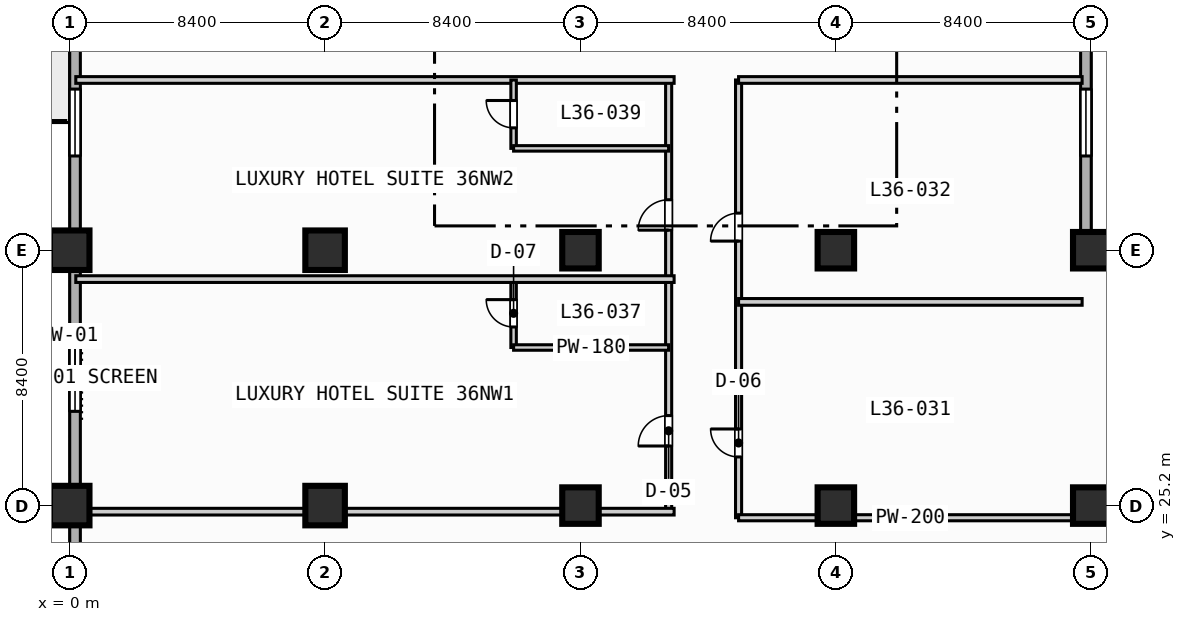
"""IFC4 building model, lengths in metres.
Left out: names, types, materials, properties, quantities, classifications, styles, units other than length and angle.
Written with IfcOpenShell. Run it as: python <this file> out.ifc"""

import sys

from ifc_helpers import new_model, si_unit, direction, frame, frame_2d, origin, origin_2d, place, context, subcontext, project, spatial, rectangle, extrude, element, fill, save


model = new_model("IFC4")
c1 = context("Model", 3, precision=1e-05, world=origin(), true_north=direction((0.0, 1.0)))
c2 = subcontext(c1, "Body", "Model", "MODEL_VIEW")
j1 = project(units=[si_unit("LENGTHUNIT", "METRE"), si_unit("PLANEANGLEUNIT", "RADIAN")], contexts=[c1])
p1 = place(None, origin())
s1 = spatial("IfcSite", under=j1, at=p1, CompositionType="ELEMENT")
p2 = place(p1, origin())
s2 = spatial("IfcBuilding", under=s1, at=p2, CompositionType="ELEMENT")
p3 = place(p2, frame((0.0, 0.0, 149.4)))
s3 = spatial("IfcBuildingStorey", under=s2, at=p3, CompositionType="ELEMENT", Elevation=149.4)
for number, where, z_axis, x_axis in (
    (1, (0.0, 25.2, 0.0), (0.0, 0.0, 1.0), (1.0, 0.0, 0.0)),
    (2, (0.0, 33.6, 0.0), (0.0, 0.0, 1.0), (1.0, 0.0, 0.0)),
    (3, (8.4, 25.2, 0.0), (0.0, 0.0, 1.0), (1.0, 0.0, 0.0)),
    (4, (8.4, 33.6, 0.0), (0.0, 0.0, 1.0), (1.0, 0.0, 0.0)),
):
    element("IfcColumn", number, at=place(p3, frame(where, z_axis=z_axis, x_axis=x_axis)), inside=s3, PredefinedType="COLUMN", context=c2, shape_type="SweptSolid", body=[
        extrude(rectangle(XDim=1.3, YDim=1.3, at=origin_2d()), origin(), (0.0, 0.0, 1.0), 3.8),
    ])
for number, where, z_axis, x_axis in (
    (5, (16.8, 25.2, 0.0), (0.0, 0.0, 1.0), (1.0, 0.0, 0.0)),
    (6, (16.8, 33.6, 0.0), (0.0, 0.0, 1.0), (1.0, 0.0, 0.0)),
    (7, (25.2, 25.2, 0.0), (0.0, 0.0, 1.0), (1.0, 0.0, 0.0)),
    (8, (25.2, 33.6, 0.0), (0.0, 0.0, 1.0), (1.0, 0.0, 0.0)),
    (9, (33.6, 25.2, 0.0), (0.0, 0.0, 1.0), (1.0, 0.0, 0.0)),
    (10, (33.6, 33.6, 0.0), (0.0, 0.0, 1.0), (1.0, 0.0, 0.0)),
):
    element("IfcColumn", number, at=place(p3, frame(where, z_axis=z_axis, x_axis=x_axis)), inside=s3, PredefinedType="COLUMN", context=c2, shape_type="SweptSolid", body=[
        extrude(rectangle(XDim=1.2, YDim=1.2, at=origin_2d()), origin(), (0.0, 0.0, 1.0), 3.8),
    ])
p4 = place(p3, frame((0.175, 3.175, 0.0), z_axis=(0.0, 0.0, 1.0), x_axis=(0.0, 1.0, 0.0)))
e11 = element("IfcWall", 11, at=p4, inside=s3, PredefinedType="STANDARD", context=c2, shape_type="SweptSolid", body=[
    extrude(rectangle(XDim=86.05, YDim=0.35, at=frame_2d((43.025, 0.0))), origin(), (0.0, 0.0, 1.0), 3.55),
])
p5 = place(p4, frame((42.325, 0.0, 0.0)))
e12 = element("IfcOpeningElement", 12, at=p5, cuts=e11, PredefinedType="OPENING", context=c2, shape_type="SweptSolid", body=[
    extrude(rectangle(XDim=1.4, YDim=2.2, at=frame_2d((0.7, 1.1))), frame((0.0, 0.185, 0.0), z_axis=(0.0, -1.0, 0.0), x_axis=(1.0, 0.0, 0.0)), (0.0, 0.0, 1.0), 0.37),
])
p6 = place(p4, frame((25.125, 0.0, 0.85)))
e13 = element("IfcOpeningElement", 13, at=p6, cuts=e11, PredefinedType="OPENING", context=c2, shape_type="SweptSolid", body=[
    extrude(rectangle(XDim=2.2, YDim=1.8, at=frame_2d((1.1, 0.9))), frame((0.0, 0.185, 0.0), z_axis=(0.0, -1.0, 0.0), x_axis=(1.0, 0.0, 0.0)), (0.0, 0.0, 1.0), 0.37),
])
p7 = place(p4, frame((33.525, 0.0, 0.85)))
e14 = element("IfcOpeningElement", 14, at=p7, cuts=e11, PredefinedType="OPENING", context=c2, shape_type="SweptSolid", body=[
    extrude(rectangle(XDim=2.2, YDim=1.8, at=frame_2d((1.1, 0.9))), frame((0.0, 0.185, 0.0), z_axis=(0.0, -1.0, 0.0), x_axis=(1.0, 0.0, 0.0)), (0.0, 0.0, 1.0), 0.37),
])
p8 = place(p4, frame((58.725, 0.0, 0.85)))
e15 = element("IfcOpeningElement", 15, at=p8, cuts=e11, PredefinedType="OPENING", context=c2, shape_type="SweptSolid", body=[
    extrude(rectangle(XDim=2.2, YDim=1.8, at=frame_2d((1.1, 0.9))), frame((0.0, 0.185, 0.0), z_axis=(0.0, -1.0, 0.0), x_axis=(1.0, 0.0, 0.0)), (0.0, 0.0, 1.0), 0.37),
])
p9 = place(p4, frame((65.125, 0.0, 0.85)))
e16 = element("IfcOpeningElement", 16, at=p9, cuts=e11, PredefinedType="OPENING", context=c2, shape_type="SweptSolid", body=[
    extrude(rectangle(XDim=1.8, YDim=1.8, at=frame_2d((0.9, 0.9))), frame((0.0, 0.185, 0.0), z_axis=(0.0, -1.0, 0.0), x_axis=(1.0, 0.0, 0.0)), (0.0, 0.0, 1.0), 0.37),
])
p10 = place(p4, frame((73.275, 0.0, 0.85)))
e17 = element("IfcOpeningElement", 17, at=p10, cuts=e11, PredefinedType="OPENING", context=c2, shape_type="SweptSolid", body=[
    extrude(rectangle(XDim=1.8, YDim=1.8, at=frame_2d((0.9, 0.9))), frame((0.0, 0.185, 0.0), z_axis=(0.0, -1.0, 0.0), x_axis=(1.0, 0.0, 0.0)), (0.0, 0.0, 1.0), 0.37),
])
p11 = place(p4, frame((81.625, 0.0, 0.85)))
e18 = element("IfcOpeningElement", 18, at=p11, cuts=e11, PredefinedType="OPENING", context=c2, shape_type="SweptSolid", body=[
    extrude(rectangle(XDim=1.8, YDim=1.8, at=frame_2d((0.9, 0.9))), frame((0.0, 0.185, 0.0), z_axis=(0.0, -1.0, 0.0), x_axis=(1.0, 0.0, 0.0)), (0.0, 0.0, 1.0), 0.37),
])
p12 = place(p3, frame((33.425, 89.225, 0.0), z_axis=(0.0, 0.0, 1.0), x_axis=(0.0, -1.0, 0.0)))
e19 = element("IfcWall", 19, at=p12, inside=s3, PredefinedType="STANDARD", context=c2, shape_type="SweptSolid", body=[
    extrude(rectangle(XDim=55.8, YDim=0.35, at=frame_2d((27.9, 0.0))), origin(), (0.0, 0.0, 1.0), 3.55),
])
p13 = place(p12, frame((50.325, 0.0, 0.85)))
e20 = element("IfcOpeningElement", 20, at=p13, cuts=e19, PredefinedType="OPENING", context=c2, shape_type="SweptSolid", body=[
    extrude(rectangle(XDim=2.2, YDim=1.8, at=frame_2d((1.1, 0.9))), frame((0.0, 0.185, 0.0), z_axis=(0.0, -1.0, 0.0), x_axis=(1.0, 0.0, 0.0)), (0.0, 0.0, 1.0), 0.37),
])
p14 = place(p12, frame((33.525, 0.0, 0.85)))
e21 = element("IfcOpeningElement", 21, at=p14, cuts=e19, PredefinedType="OPENING", context=c2, shape_type="SweptSolid", body=[
    extrude(rectangle(XDim=2.2, YDim=1.8, at=frame_2d((1.1, 0.9))), frame((0.0, 0.185, 0.0), z_axis=(0.0, -1.0, 0.0), x_axis=(1.0, 0.0, 0.0)), (0.0, 0.0, 1.0), 0.37),
])
p15 = place(p12, frame((25.125, 0.0, 0.85)))
e22 = element("IfcOpeningElement", 22, at=p15, cuts=e19, PredefinedType="OPENING", context=c2, shape_type="SweptSolid", body=[
    extrude(rectangle(XDim=2.2, YDim=1.8, at=frame_2d((1.1, 0.9))), frame((0.0, 0.185, 0.0), z_axis=(0.0, -1.0, 0.0), x_axis=(1.0, 0.0, 0.0)), (0.0, 0.0, 1.0), 0.37),
])
p16 = place(p12, frame((16.725, 0.0, 0.85)))
e23 = element("IfcOpeningElement", 23, at=p16, cuts=e19, PredefinedType="OPENING", context=c2, shape_type="SweptSolid", body=[
    extrude(rectangle(XDim=2.2, YDim=1.8, at=frame_2d((1.1, 0.9))), frame((0.0, 0.185, 0.0), z_axis=(0.0, -1.0, 0.0), x_axis=(1.0, 0.0, 0.0)), (0.0, 0.0, 1.0), 0.37),
])
p17 = place(p12, frame((8.325, 0.0, 0.85)))
e24 = element("IfcOpeningElement", 24, at=p17, cuts=e19, PredefinedType="OPENING", context=c2, shape_type="SweptSolid", body=[
    extrude(rectangle(XDim=2.2, YDim=1.8, at=frame_2d((1.1, 0.9))), frame((0.0, 0.185, 0.0), z_axis=(0.0, -1.0, 0.0), x_axis=(1.0, 0.0, 0.0)), (0.0, 0.0, 1.0), 0.37),
])
p18 = place(p3, frame((33.425, 33.425, 0.0), z_axis=(0.0, 0.0, 1.0), x_axis=(1.0, 0.0, 0.0)))
e25 = element("IfcWall", 25, at=p18, inside=s3, PredefinedType="STANDARD", context=c2, shape_type="SweptSolid", body=[
    extrude(rectangle(XDim=39.0, YDim=0.35, at=frame_2d((19.5, 0.0))), origin(), (0.0, 0.0, 1.0), 3.55),
])
p19 = place(p18, frame((12.075, 0.0, 0.0)))
e26 = element("IfcOpeningElement", 26, at=p19, cuts=e25, PredefinedType="OPENING", context=c2, shape_type="SweptSolid", body=[
    extrude(rectangle(XDim=1.4, YDim=2.2, at=frame_2d((0.7, 1.1))), frame((0.0, 0.185, 0.0), z_axis=(0.0, -1.0, 0.0), x_axis=(1.0, 0.0, 0.0)), (0.0, 0.0, 1.0), 0.37),
])
p20 = place(p18, frame((20.075, 0.0, 0.85)))
e27 = element("IfcOpeningElement", 27, at=p20, cuts=e25, PredefinedType="OPENING", context=c2, shape_type="SweptSolid", body=[
    extrude(rectangle(XDim=2.2, YDim=1.8, at=frame_2d((1.1, 0.9))), frame((0.0, 0.185, 0.0), z_axis=(0.0, -1.0, 0.0), x_axis=(1.0, 0.0, 0.0)), (0.0, 0.0, 1.0), 0.37),
])
p21 = place(p18, frame((28.475, 0.0, 0.85)))
e28 = element("IfcOpeningElement", 28, at=p21, cuts=e25, PredefinedType="OPENING", context=c2, shape_type="SweptSolid", body=[
    extrude(rectangle(XDim=2.2, YDim=1.8, at=frame_2d((1.1, 0.9))), frame((0.0, 0.185, 0.0), z_axis=(0.0, -1.0, 0.0), x_axis=(1.0, 0.0, 0.0)), (0.0, 0.0, 1.0), 0.37),
])
p22 = place(p3, frame((22.0, 24.8, 0.0), z_axis=(0.0, 0.0, 1.0), x_axis=(0.0, 1.0, 0.0)))
e29 = element("IfcWall", 29, at=p22, inside=s3, PredefinedType="PARTITIONING", context=c2, shape_type="SweptSolid", body=[
    extrude(rectangle(XDim=14.4, YDim=0.2, at=frame_2d((7.2, 0.0))), origin(), (0.0, 0.0, 1.0), 3.55),
])
p23 = place(p22, frame((2.0, 0.0, 0.0)))
e30 = element("IfcOpeningElement", 30, at=p23, cuts=e29, PredefinedType="OPENING", context=c2, shape_type="SweptSolid", body=[
    extrude(rectangle(XDim=0.92, YDim=2.1, at=frame_2d((0.46, 1.05))), frame((0.0, 0.11, 0.0), z_axis=(0.0, -1.0, 0.0), x_axis=(1.0, 0.0, 0.0)), (0.0, 0.0, 1.0), 0.22),
])
p24 = place(p22, frame((9.1, 0.0, 0.0)))
e31 = element("IfcOpeningElement", 31, at=p24, cuts=e29, PredefinedType="OPENING", context=c2, shape_type="SweptSolid", body=[
    extrude(rectangle(XDim=0.92, YDim=2.1, at=frame_2d((0.46, 1.05))), frame((0.0, 0.11, 0.0), z_axis=(0.0, -1.0, 0.0), x_axis=(1.0, 0.0, 0.0)), (0.0, 0.0, 1.0), 0.22),
])
p25 = place(p3, frame((22.0, 24.8, 0.0), z_axis=(0.0, 0.0, 1.0), x_axis=(1.0, 0.0, 0.0)))
e32 = element("IfcWall", 32, at=p25, inside=s3, PredefinedType="PARTITIONING", context=c2, shape_type="SweptSolid", body=[
    extrude(rectangle(XDim=11.3, YDim=0.2, at=frame_2d((5.65, 0.0))), origin(), (0.0, 0.0, 1.0), 3.55),
])
for number, where, z_axis, x_axis in (
    (33, (22.0, 31.9, 0.0), (0.0, 0.0, 1.0), (1.0, 0.0, 0.0)),
    (34, (22.0, 39.2, 0.0), (0.0, 0.0, 1.0), (1.0, 0.0, 0.0)),
):
    element("IfcWall", number, at=place(p3, frame(where, z_axis=z_axis, x_axis=x_axis)), inside=s3, PredefinedType="PARTITIONING", context=c2, shape_type="SweptSolid", body=[
        extrude(rectangle(XDim=11.3, YDim=0.22, at=frame_2d((5.65, 0.0))), origin(), (0.0, 0.0, 1.0), 3.55),
    ])
p26 = place(p3, frame((19.7, 25.0, 0.0), z_axis=(0.0, 0.0, 1.0), x_axis=(0.0, 1.0, 0.0)))
e35 = element("IfcWall", 35, at=p26, inside=s3, PredefinedType="PARTITIONING", context=c2, shape_type="SweptSolid", body=[
    extrude(rectangle(XDim=14.2, YDim=0.2, at=frame_2d((7.1, 0.0))), origin(), (0.0, 0.0, 1.0), 3.55),
])
p27 = place(p26, frame((2.16, 0.0, 0.0)))
e36 = element("IfcOpeningElement", 36, at=p27, cuts=e35, PredefinedType="OPENING", context=c2, shape_type="SweptSolid", body=[
    extrude(rectangle(XDim=1.0, YDim=2.15, at=frame_2d((0.5, 1.075))), frame((0.0, 0.11, 0.0), z_axis=(0.0, -1.0, 0.0), x_axis=(1.0, 0.0, 0.0)), (0.0, 0.0, 1.0), 0.22),
])
p28 = place(p26, frame((9.26, 0.0, 0.0)))
e37 = element("IfcOpeningElement", 37, at=p28, cuts=e35, PredefinedType="OPENING", context=c2, shape_type="SweptSolid", body=[
    extrude(rectangle(XDim=1.0, YDim=2.15, at=frame_2d((0.5, 1.075))), frame((0.0, 0.11, 0.0), z_axis=(0.0, -1.0, 0.0), x_axis=(1.0, 0.0, 0.0)), (0.0, 0.0, 1.0), 0.22),
])
p29 = place(p3, frame((0.2, 25.0, 0.0), z_axis=(0.0, 0.0, 1.0), x_axis=(1.0, 0.0, 0.0)))
e38 = element("IfcWall", 38, at=p29, inside=s3, PredefinedType="PARTITIONING", context=c2, shape_type="SweptSolid", body=[
    extrude(rectangle(XDim=19.68, YDim=0.22, at=frame_2d((9.84, 0.0))), origin(), (0.0, 0.0, 1.0), 2.9),
])
p30 = place(p3, frame((14.6, 30.4, 0.0), z_axis=(0.0, 0.0, 1.0), x_axis=(0.0, 1.0, 0.0)))
e39 = element("IfcWall", 39, at=p30, inside=s3, PredefinedType="PLUMBINGWALL", context=c2, shape_type="SweptSolid", body=[
    extrude(rectangle(XDim=2.25, YDim=0.18, at=frame_2d((1.125, 0.0))), origin(), (0.0, 0.0, 1.0), 3.55),
])
p31 = place(p30, frame((0.675, 0.0, 0.0)))
e40 = element("IfcOpeningElement", 40, at=p31, cuts=e39, PredefinedType="OPENING", context=c2, shape_type="SweptSolid", body=[
    extrude(rectangle(XDim=0.9, YDim=2.1, at=frame_2d((0.45, 1.05))), frame((0.0, 0.1, 0.0), z_axis=(0.0, -1.0, 0.0), x_axis=(1.0, 0.0, 0.0)), (0.0, 0.0, 1.0), 0.2),
])
p32 = place(p3, frame((14.6, 30.4, 0.0), z_axis=(0.0, 0.0, 1.0), x_axis=(1.0, 0.0, 0.0)))
e41 = element("IfcWall", 41, at=p32, inside=s3, PredefinedType="PLUMBINGWALL", context=c2, shape_type="SweptSolid", body=[
    extrude(rectangle(XDim=5.1, YDim=0.18, at=frame_2d((2.55, 0.0))), origin(), (0.0, 0.0, 1.0), 3.55),
])
for number, where, z_axis, x_axis in (
    (42, (0.2, 32.65, 0.0), (0.0, 0.0, 1.0), (1.0, 0.0, 0.0)),
    (43, (0.2, 39.2, 0.0), (0.0, 0.0, 1.0), (1.0, 0.0, 0.0)),
):
    element("IfcWall", number, at=place(p3, frame(where, z_axis=z_axis, x_axis=x_axis)), inside=s3, PredefinedType="PARTITIONING", context=c2, shape_type="SweptSolid", body=[
        extrude(rectangle(XDim=19.68, YDim=0.22, at=frame_2d((9.84, 0.0))), origin(), (0.0, 0.0, 1.0), 3.55),
    ])
p33 = place(p3, frame((14.6, 36.95, 0.0), z_axis=(0.0, 0.0, 1.0), x_axis=(0.0, 1.0, 0.0)))
e44 = element("IfcWall", 44, at=p33, inside=s3, PredefinedType="PLUMBINGWALL", context=c2, shape_type="SweptSolid", body=[
    extrude(rectangle(XDim=2.25, YDim=0.18, at=frame_2d((1.125, 0.0))), origin(), (0.0, 0.0, 1.0), 3.55),
])
p34 = place(p33, frame((0.675, 0.0, 0.0)))
e45 = element("IfcOpeningElement", 45, at=p34, cuts=e44, PredefinedType="OPENING", context=c2, shape_type="SweptSolid", body=[
    extrude(rectangle(XDim=0.9, YDim=2.1, at=frame_2d((0.45, 1.05))), frame((0.0, 0.1, 0.0), z_axis=(0.0, -1.0, 0.0), x_axis=(1.0, 0.0, 0.0)), (0.0, 0.0, 1.0), 0.2),
])
p35 = place(p3, frame((14.6, 36.95, 0.0), z_axis=(0.0, 0.0, 1.0), x_axis=(1.0, 0.0, 0.0)))
e46 = element("IfcWall", 46, at=p35, inside=s3, PredefinedType="PLUMBINGWALL", context=c2, shape_type="SweptSolid", body=[
    extrude(rectangle(XDim=5.1, YDim=0.18, at=frame_2d((2.55, 0.0))), origin(), (0.0, 0.0, 1.0), 3.55),
])
p36 = place(p6, origin())
e47 = element("IfcWindow", 47, at=p36, inside=s3, PartitioningType="SINGLE_PANEL", PredefinedType="WINDOW", context=c2, shape_type="SweptSolid", body=[
    extrude(rectangle(XDim=2.2, YDim=1.8, at=frame_2d((1.1, 0.9))), frame((0.0, 0.03, 0.0), z_axis=(0.0, -1.0, 0.0), x_axis=(1.0, 0.0, 0.0)), (0.0, 0.0, 1.0), 0.06),
])
fill(e13, e47)
p37 = place(p7, origin())
e48 = element("IfcWindow", 48, at=p37, inside=s3, PartitioningType="SINGLE_PANEL", PredefinedType="WINDOW", context=c2, shape_type="SweptSolid", body=[
    extrude(rectangle(XDim=2.2, YDim=1.8, at=frame_2d((1.1, 0.9))), frame((0.0, 0.03, 0.0), z_axis=(0.0, -1.0, 0.0), x_axis=(1.0, 0.0, 0.0)), (0.0, 0.0, 1.0), 0.06),
])
fill(e14, e48)
p38 = place(p13, origin())
e49 = element("IfcWindow", 49, at=p38, inside=s3, PartitioningType="SINGLE_PANEL", PredefinedType="WINDOW", context=c2, shape_type="SweptSolid", body=[
    extrude(rectangle(XDim=2.2, YDim=1.8, at=frame_2d((1.1, 0.9))), frame((0.0, 0.03, 0.0), z_axis=(0.0, -1.0, 0.0), x_axis=(1.0, 0.0, 0.0)), (0.0, 0.0, 1.0), 0.06),
])
fill(e20, e49)
p39 = place(p23, origin())
e50 = element("IfcDoor", 50, at=p39, inside=s3, OperationType="SINGLE_SWING_RIGHT", PredefinedType="DOOR", context=c2, shape_type="SweptSolid", body=[
    extrude(rectangle(XDim=0.92, YDim=2.1, at=frame_2d((0.46, 1.05))), frame((0.0, 0.025, 0.0), z_axis=(0.0, -1.0, 0.0), x_axis=(1.0, 0.0, 0.0)), (0.0, 0.0, 1.0), 0.05),
])
fill(e30, e50)
p40 = place(p24, origin())
e51 = element("IfcDoor", 51, at=p40, inside=s3, OperationType="SINGLE_SWING_LEFT", PredefinedType="DOOR", context=c2, shape_type="SweptSolid", body=[
    extrude(rectangle(XDim=0.92, YDim=2.1, at=frame_2d((0.46, 1.05))), frame((0.0, 0.025, 0.0), z_axis=(0.0, -1.0, 0.0), x_axis=(1.0, 0.0, 0.0)), (0.0, 0.0, 1.0), 0.05),
])
fill(e31, e51)
p41 = place(p27, origin())
e52 = element("IfcDoor", 52, at=p41, inside=s3, OperationType="SINGLE_SWING_LEFT", PredefinedType="DOOR", context=c2, shape_type="SweptSolid", body=[
    extrude(rectangle(XDim=1.0, YDim=2.15, at=frame_2d((0.5, 1.075))), frame((0.0, 0.025, 0.0), z_axis=(0.0, -1.0, 0.0), x_axis=(1.0, 0.0, 0.0)), (0.0, 0.0, 1.0), 0.05),
])
fill(e36, e52)
p42 = place(p28, origin())
e53 = element("IfcDoor", 53, at=p42, inside=s3, OperationType="SINGLE_SWING_LEFT", PredefinedType="DOOR", context=c2, shape_type="SweptSolid", body=[
    extrude(rectangle(XDim=1.0, YDim=2.15, at=frame_2d((0.5, 1.075))), frame((0.0, 0.025, 0.0), z_axis=(0.0, -1.0, 0.0), x_axis=(1.0, 0.0, 0.0)), (0.0, 0.0, 1.0), 0.05),
])
fill(e37, e53)
p43 = place(p31, origin())
e54 = element("IfcDoor", 54, at=p43, inside=s3, OperationType="SINGLE_SWING_RIGHT", PredefinedType="DOOR", context=c2, shape_type="SweptSolid", body=[
    extrude(rectangle(XDim=0.9, YDim=2.1, at=frame_2d((0.45, 1.05))), frame((0.0, 0.025, 0.0), z_axis=(0.0, -1.0, 0.0), x_axis=(1.0, 0.0, 0.0)), (0.0, 0.0, 1.0), 0.05),
])
fill(e40, e54)
p44 = place(p34, origin())
e55 = element("IfcDoor", 55, at=p44, inside=s3, OperationType="SINGLE_SWING_RIGHT", PredefinedType="DOOR", context=c2, shape_type="SweptSolid", body=[
    extrude(rectangle(XDim=0.9, YDim=2.1, at=frame_2d((0.45, 1.05))), frame((0.0, 0.025, 0.0), z_axis=(0.0, -1.0, 0.0), x_axis=(1.0, 0.0, 0.0)), (0.0, 0.0, 1.0), 0.05),
])
fill(e45, e55)
save(model, sys.argv[1])
